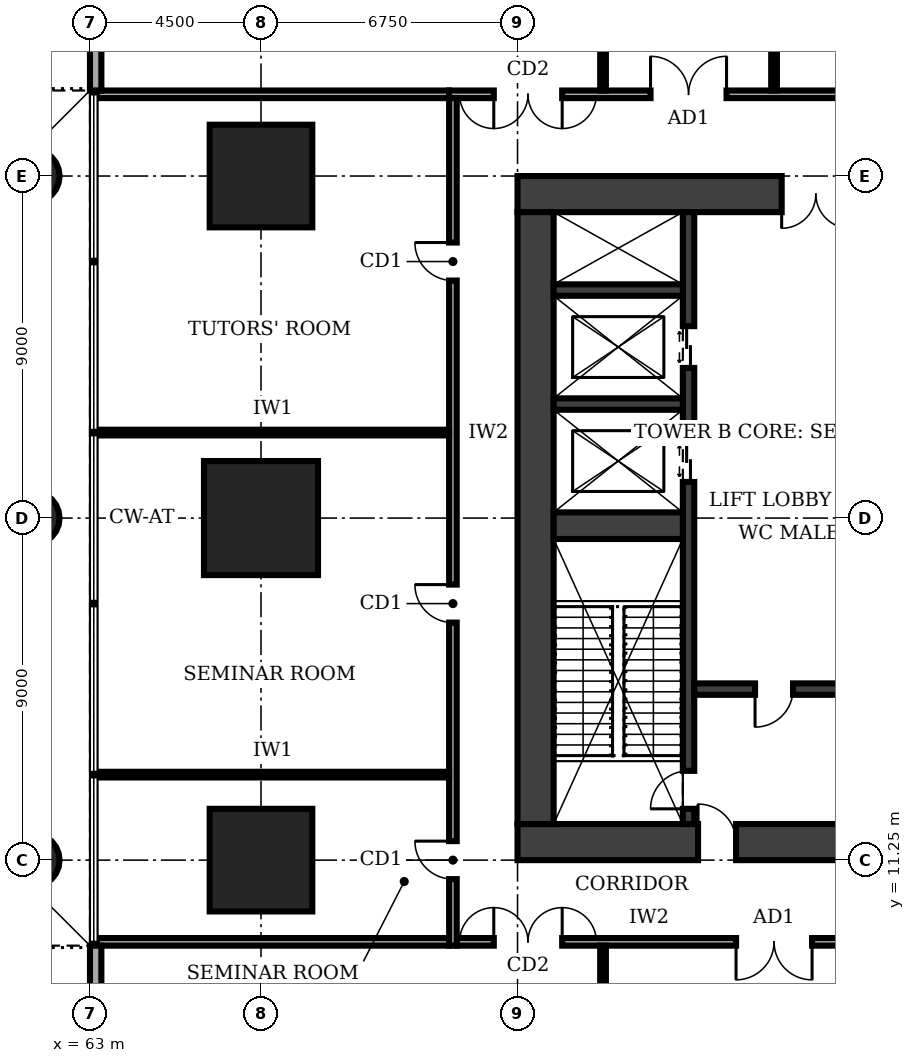
"""IFC4 building model, lengths in metres.
Left out: names, types, materials, properties, quantities, classifications, styles, units other than length and angle.
Written with IfcOpenShell. Run it as: python <this file> out.ifc"""

import sys

from ifc_helpers import new_model, si_unit, direction, frame, frame_2d, origin, origin_2d, place, context, subcontext, project, spatial, rectangle, circle, extrude, element, fill, save


model = new_model("IFC4")
c1 = context("Model", 3, precision=1e-05, world=origin(), true_north=direction((0.0, 1.0)))
c2 = subcontext(c1, "Body", "Model", "MODEL_VIEW")
j1 = project(units=[si_unit("LENGTHUNIT", "METRE"), si_unit("PLANEANGLEUNIT", "RADIAN")], contexts=[c1])
p1 = place(None, origin())
s1 = spatial("IfcSite", under=j1, at=p1, CompositionType="ELEMENT")
p2 = place(p1, origin())
s2 = spatial("IfcBuilding", under=s1, at=p2, CompositionType="ELEMENT")
p3 = place(p2, frame((0.0, 0.0, 6.0)))
s3 = spatial("IfcBuildingStorey", under=s2, at=p3, CompositionType="ELEMENT", Elevation=6.0)
p4 = place(p3, frame((74.25, 11.725, 0.0), z_axis=(0.0, 0.0, 1.0), x_axis=(1.0, 0.0, 0.0)))
e1 = element("IfcWall", 1, at=p4, inside=s3, PredefinedType="SHEAR", context=c2, shape_type="SweptSolid", body=[
    extrude(rectangle(XDim=13.5, YDim=0.95, at=frame_2d((6.75, 0.0))), origin(), (0.0, 0.0, 1.0), 5.0),
])
p5 = place(p4, frame((4.75, 0.0, 0.0)))
e2 = element("IfcOpeningElement", 2, at=p5, cuts=e1, PredefinedType="OPENING", context=c2, shape_type="SweptSolid", body=[
    extrude(rectangle(XDim=1.0, YDim=2.1, at=frame_2d((0.5, 1.05))), frame((0.0, 0.485, 0.0), z_axis=(0.0, -1.0, 0.0), x_axis=(1.0, 0.0, 0.0)), (0.0, 0.0, 1.0), 0.97),
])
p6 = place(p3, frame((87.75, 28.775, 0.0), z_axis=(0.0, 0.0, 1.0), x_axis=(-1.0, 0.0, 0.0)))
e3 = element("IfcWall", 3, at=p6, inside=s3, PredefinedType="SHEAR", context=c2, shape_type="SweptSolid", body=[
    extrude(rectangle(XDim=13.5, YDim=0.95, at=frame_2d((6.75, 0.0))), origin(), (0.0, 0.0, 1.0), 5.0),
])
p7 = place(p6, frame((4.75, 0.0, 0.0)))
e4 = element("IfcOpeningElement", 4, at=p7, cuts=e3, PredefinedType="OPENING", context=c2, shape_type="SweptSolid", body=[
    extrude(rectangle(XDim=1.8, YDim=2.1, at=frame_2d((0.9, 1.05))), frame((0.0, 0.485, 0.0), z_axis=(0.0, -1.0, 0.0), x_axis=(1.0, 0.0, 0.0)), (0.0, 0.0, 1.0), 0.97),
])
p8 = place(p3, frame((74.725, 28.3, 0.0), z_axis=(0.0, 0.0, 1.0), x_axis=(0.0, -1.0, 0.0)))
e5 = element("IfcWall", 5, at=p8, inside=s3, PredefinedType="SHEAR", context=c2, shape_type="SweptSolid", body=[
    extrude(rectangle(XDim=16.1, YDim=0.95, at=frame_2d((8.05, 0.0))), origin(), (0.0, 0.0, 1.0), 5.0),
])
p9 = place(p3, frame((78.75, 12.2, 0.0), z_axis=(0.0, 0.0, 1.0), x_axis=(0.0, 1.0, 0.0)))
e6 = element("IfcWall", 6, at=p9, inside=s3, PredefinedType="SHEAR", context=c2, shape_type="SweptSolid", body=[
    extrude(rectangle(XDim=16.1, YDim=0.3, at=frame_2d((8.05, 0.0))), origin(), (0.0, 0.0, 1.0), 5.0),
])
p10 = place(p9, frame((0.4, 0.0, 0.0)))
e7 = element("IfcOpeningElement", 7, at=p10, cuts=e6, PredefinedType="OPENING", context=c2, shape_type="SweptSolid", body=[
    extrude(rectangle(XDim=1.0, YDim=2.1, at=frame_2d((0.5, 1.05))), frame((0.0, 0.16, 0.0), z_axis=(0.0, -1.0, 0.0), x_axis=(1.0, 0.0, 0.0)), (0.0, 0.0, 1.0), 0.32),
])
p11 = place(p9, frame((9.0, 0.0, 0.0)))
e8 = element("IfcOpeningElement", 8, at=p11, cuts=e6, PredefinedType="OPENING", context=c2, shape_type="SweptSolid", body=[
    extrude(rectangle(XDim=1.1, YDim=2.1, at=frame_2d((0.55, 1.05))), frame((0.0, 0.16, 0.0), z_axis=(0.0, -1.0, 0.0), x_axis=(1.0, 0.0, 0.0)), (0.0, 0.0, 1.0), 0.32),
])
p12 = place(p9, frame((12.0, 0.0, 0.0)))
e9 = element("IfcOpeningElement", 9, at=p12, cuts=e6, PredefinedType="OPENING", context=c2, shape_type="SweptSolid", body=[
    extrude(rectangle(XDim=1.1, YDim=2.1, at=frame_2d((0.55, 1.05))), frame((0.0, 0.16, 0.0), z_axis=(0.0, -1.0, 0.0), x_axis=(1.0, 0.0, 0.0)), (0.0, 0.0, 1.0), 0.32),
])
p13 = place(p3, frame((75.2, 20.05, 0.0), z_axis=(0.0, 0.0, 1.0), x_axis=(1.0, 0.0, 0.0)))
e10 = element("IfcWall", 10, at=p13, inside=s3, PredefinedType="SHEAR", context=c2, shape_type="SweptSolid", body=[
    extrude(rectangle(XDim=3.4, YDim=0.7, at=frame_2d((1.7, 0.0))), origin(), (0.0, 0.0, 1.0), 5.0),
])
p14 = place(p3, frame((78.9, 15.75, 0.0), z_axis=(0.0, 0.0, 1.0), x_axis=(1.0, 0.0, 0.0)))
e11 = element("IfcWall", 11, at=p14, inside=s3, PredefinedType="SHEAR", context=c2, shape_type="SweptSolid", body=[
    extrude(rectangle(XDim=4.2, YDim=0.3, at=frame_2d((2.1, 0.0))), origin(), (0.0, 0.0, 1.0), 5.0),
])
p15 = place(p14, frame((1.6, 0.0, 0.0)))
e12 = element("IfcOpeningElement", 12, at=p15, cuts=e11, PredefinedType="OPENING", context=c2, shape_type="SweptSolid", body=[
    extrude(rectangle(XDim=1.0, YDim=2.1, at=frame_2d((0.5, 1.05))), frame((0.0, 0.16, 0.0), z_axis=(0.0, -1.0, 0.0), x_axis=(1.0, 0.0, 0.0)), (0.0, 0.0, 1.0), 0.32),
])
for number, where, z_axis, x_axis in (
    (13, (75.2, 23.25, 0.0), (0.0, 0.0, 1.0), (1.0, 0.0, 0.0)),
    (14, (75.2, 26.25, 0.0), (0.0, 0.0, 1.0), (1.0, 0.0, 0.0)),
):
    element("IfcWall", number, at=place(p3, frame(where, z_axis=z_axis, x_axis=x_axis)), inside=s3, PredefinedType="SHEAR", context=c2, shape_type="SweptSolid", body=[
        extrude(rectangle(XDim=3.4, YDim=0.3, at=frame_2d((1.7, 0.0))), origin(), (0.0, 0.0, 1.0), 5.0),
    ])
p16 = place(p3, frame((67.5, 11.25, 0.0), z_axis=(0.0, 0.0, 1.0), x_axis=(1.0, 0.0, 0.0)))
e15 = element("IfcColumn", 15, at=p16, inside=s3, PredefinedType="COLUMN", context=c2, shape_type="SweptSolid", body=[
    extrude(rectangle(XDim=2.7, YDim=2.7, at=origin_2d()), origin(), (0.0, 0.0, 1.0), 5.0),
])
p17 = place(p3, frame((67.5, 20.25, 0.0), z_axis=(0.0, 0.0, 1.0), x_axis=(1.0, 0.0, 0.0)))
e16 = element("IfcColumn", 16, at=p17, inside=s3, PredefinedType="COLUMN", context=c2, shape_type="SweptSolid", body=[
    extrude(rectangle(XDim=3.0, YDim=3.0, at=origin_2d()), origin(), (0.0, 0.0, 1.0), 5.0),
])
p18 = place(p3, frame((67.5, 29.25, 0.0), z_axis=(0.0, 0.0, 1.0), x_axis=(1.0, 0.0, 0.0)))
e17 = element("IfcColumn", 17, at=p18, inside=s3, PredefinedType="COLUMN", context=c2, shape_type="SweptSolid", body=[
    extrude(rectangle(XDim=2.7, YDim=2.7, at=origin_2d()), origin(), (0.0, 0.0, 1.0), 5.0),
])
for number, where, z_axis, x_axis in (
    (18, (61.5, 11.25, 0.0), (0.0, 0.0, 1.0), (1.0, 0.0, 0.0)),
    (19, (61.5, 20.25, 0.0), (0.0, 0.0, 1.0), (1.0, 0.0, 0.0)),
    (20, (61.5, 29.25, 0.0), (0.0, 0.0, 1.0), (1.0, 0.0, 0.0)),
):
    element("IfcColumn", number, at=place(p3, frame(where, z_axis=z_axis, x_axis=x_axis)), inside=s3, PredefinedType="COLUMN", context=c2, shape_type="SweptSolid", body=[
        extrude(circle(Radius=0.7, at=origin_2d()), origin(), (0.0, 0.0, 1.0), 5.0),
    ])
p19 = place(p3, frame((72.65, 9.1, 0.0), z_axis=(0.0, 0.0, 1.0), x_axis=(1.0, 0.0, 0.0)))
e21 = element("IfcWall", 21, at=p19, inside=s3, PredefinedType="SOLIDWALL", context=c2, shape_type="SweptSolid", body=[
    extrude(rectangle(XDim=16.9, YDim=0.2, at=frame_2d((8.45, 0.0))), origin(), (0.0, 0.0, 1.0), 4.7),
])
p20 = place(p19, frame((0.975, 0.0, 0.0)))
e22 = element("IfcOpeningElement", 22, at=p20, cuts=e21, PredefinedType="OPENING", context=c2, shape_type="SweptSolid", body=[
    extrude(rectangle(XDim=1.8, YDim=2.1, at=frame_2d((0.9, 1.05))), frame((0.0, 0.11, 0.0), z_axis=(0.0, -1.0, 0.0), x_axis=(1.0, 0.0, 0.0)), (0.0, 0.0, 1.0), 0.22),
])
p21 = place(p19, frame((7.35, 0.0, 0.0)))
e23 = element("IfcOpeningElement", 23, at=p21, cuts=e21, PredefinedType="OPENING", context=c2, shape_type="SweptSolid", body=[
    extrude(rectangle(XDim=2.0, YDim=2.4, at=frame_2d((1.0, 1.2))), frame((0.0, 0.11, 0.0), z_axis=(0.0, -1.0, 0.0), x_axis=(1.0, 0.0, 0.0)), (0.0, 0.0, 1.0), 0.22),
])
p22 = place(p19, frame((13.625, 0.0, 0.0)))
e24 = element("IfcOpeningElement", 24, at=p22, cuts=e21, PredefinedType="OPENING", context=c2, shape_type="SweptSolid", body=[
    extrude(rectangle(XDim=2.0, YDim=2.4, at=frame_2d((1.0, 1.2))), frame((0.0, 0.11, 0.0), z_axis=(0.0, -1.0, 0.0), x_axis=(1.0, 0.0, 0.0)), (0.0, 0.0, 1.0), 0.22),
])
p23 = place(p3, frame((89.35, 31.4, 0.0), z_axis=(0.0, 0.0, 1.0), x_axis=(-1.0, 0.0, 0.0)))
e25 = element("IfcWall", 25, at=p23, inside=s3, PredefinedType="SOLIDWALL", context=c2, shape_type="SweptSolid", body=[
    extrude(rectangle(XDim=16.9, YDim=0.2, at=frame_2d((8.45, 0.0))), origin(), (0.0, 0.0, 1.0), 4.7),
])
p24 = place(p23, frame((13.925, 0.0, 0.0)))
e26 = element("IfcOpeningElement", 26, at=p24, cuts=e25, PredefinedType="OPENING", context=c2, shape_type="SweptSolid", body=[
    extrude(rectangle(XDim=1.8, YDim=2.1, at=frame_2d((0.9, 1.05))), frame((0.0, 0.11, 0.0), z_axis=(0.0, -1.0, 0.0), x_axis=(1.0, 0.0, 0.0)), (0.0, 0.0, 1.0), 0.22),
])
p25 = place(p23, frame((9.6, 0.0, 0.0)))
e27 = element("IfcOpeningElement", 27, at=p25, cuts=e25, PredefinedType="OPENING", context=c2, shape_type="SweptSolid", body=[
    extrude(rectangle(XDim=2.0, YDim=2.4, at=frame_2d((1.0, 1.2))), frame((0.0, 0.11, 0.0), z_axis=(0.0, -1.0, 0.0), x_axis=(1.0, 0.0, 0.0)), (0.0, 0.0, 1.0), 0.22),
])
p26 = place(p23, frame((5.6, 0.0, 0.0)))
e28 = element("IfcOpeningElement", 28, at=p26, cuts=e25, PredefinedType="OPENING", context=c2, shape_type="SweptSolid", body=[
    extrude(rectangle(XDim=1.0, YDim=2.1, at=frame_2d((0.5, 1.05))), frame((0.0, 0.11, 0.0), z_axis=(0.0, -1.0, 0.0), x_axis=(1.0, 0.0, 0.0)), (0.0, 0.0, 1.0), 0.22),
])
p27 = place(p23, frame((0.925, 0.0, 0.0)))
e29 = element("IfcOpeningElement", 29, at=p27, cuts=e25, PredefinedType="OPENING", context=c2, shape_type="SweptSolid", body=[
    extrude(rectangle(XDim=1.8, YDim=2.1, at=frame_2d((0.9, 1.05))), frame((0.0, 0.11, 0.0), z_axis=(0.0, -1.0, 0.0), x_axis=(1.0, 0.0, 0.0)), (0.0, 0.0, 1.0), 0.22),
])
p28 = place(p3, frame((72.55, 31.3, 0.0), z_axis=(0.0, 0.0, 1.0), x_axis=(0.0, -1.0, 0.0)))
e30 = element("IfcWall", 30, at=p28, inside=s3, PredefinedType="SOLIDWALL", context=c2, shape_type="SweptSolid", body=[
    extrude(rectangle(XDim=22.3, YDim=0.2, at=frame_2d((11.15, 0.0))), origin(), (0.0, 0.0, 1.0), 4.7),
])
p29 = place(p28, frame((19.55, 0.0, 0.0)))
e31 = element("IfcOpeningElement", 31, at=p29, cuts=e30, PredefinedType="OPENING", context=c2, shape_type="SweptSolid", body=[
    extrude(rectangle(XDim=1.0, YDim=2.1, at=frame_2d((0.5, 1.05))), frame((0.0, 0.11, 0.0), z_axis=(0.0, -1.0, 0.0), x_axis=(1.0, 0.0, 0.0)), (0.0, 0.0, 1.0), 0.22),
])
p30 = place(p28, frame((12.8, 0.0, 0.0)))
e32 = element("IfcOpeningElement", 32, at=p30, cuts=e30, PredefinedType="OPENING", context=c2, shape_type="SweptSolid", body=[
    extrude(rectangle(XDim=1.0, YDim=2.1, at=frame_2d((0.5, 1.05))), frame((0.0, 0.11, 0.0), z_axis=(0.0, -1.0, 0.0), x_axis=(1.0, 0.0, 0.0)), (0.0, 0.0, 1.0), 0.22),
])
p31 = place(p28, frame((3.8, 0.0, 0.0)))
e33 = element("IfcOpeningElement", 33, at=p31, cuts=e30, PredefinedType="OPENING", context=c2, shape_type="SweptSolid", body=[
    extrude(rectangle(XDim=1.0, YDim=2.1, at=frame_2d((0.5, 1.05))), frame((0.0, 0.11, 0.0), z_axis=(0.0, -1.0, 0.0), x_axis=(1.0, 0.0, 0.0)), (0.0, 0.0, 1.0), 0.22),
])
for number, where, z_axis, x_axis in (
    (34, (63.18, 9.1, 0.0), (0.0, 0.0, 1.0), (1.0, 0.0, 0.0)),
    (35, (63.18, 31.4, 0.0), (0.0, 0.0, 1.0), (1.0, 0.0, 0.0)),
):
    element("IfcWall", number, at=place(p3, frame(where, z_axis=z_axis, x_axis=x_axis)), inside=s3, PredefinedType="SOLIDWALL", context=c2, shape_type="SweptSolid", body=[
        extrude(rectangle(XDim=9.27, YDim=0.2, at=frame_2d((4.635, 0.0))), origin(), (0.0, 0.0, 1.0), 4.7),
    ])
p32 = place(p3, frame((76.5, -4.2, 0.0), z_axis=(0.0, 0.0, 1.0), x_axis=(0.0, 1.0, 0.0)))
e36 = element("IfcWall", 36, at=p32, inside=s3, PredefinedType="PARTITIONING", context=c2, shape_type="SweptSolid", body=[
    extrude(rectangle(XDim=13.2, YDim=0.15, at=frame_2d((6.6, 0.0))), origin(), (0.0, 0.0, 1.0), 4.7),
])
p33 = place(p3, frame((76.5, 31.5, 0.0), z_axis=(0.0, 0.0, 1.0), x_axis=(0.0, 1.0, 0.0)))
e37 = element("IfcWall", 37, at=p33, inside=s3, PredefinedType="PARTITIONING", context=c2, shape_type="SweptSolid", body=[
    extrude(rectangle(XDim=17.7, YDim=0.15, at=frame_2d((8.85, 0.0))), origin(), (0.0, 0.0, 1.0), 4.7),
])
p34 = place(p33, frame((12.85, 0.0, 0.0)))
e38 = element("IfcOpeningElement", 38, at=p34, cuts=e37, PredefinedType="OPENING", context=c2, shape_type="SweptSolid", body=[
    extrude(rectangle(XDim=1.0, YDim=2.1, at=frame_2d((0.5, 1.05))), frame((0.0, 0.085, 0.0), z_axis=(0.0, -1.0, 0.0), x_axis=(1.0, 0.0, 0.0)), (0.0, 0.0, 1.0), 0.17),
])
p35 = place(p3, frame((81.0, 31.5, 0.0), z_axis=(0.0, 0.0, 1.0), x_axis=(0.0, 1.0, 0.0)))
e39 = element("IfcWall", 39, at=p35, inside=s3, PredefinedType="PARTITIONING", context=c2, shape_type="SweptSolid", body=[
    extrude(rectangle(XDim=4.9, YDim=0.15, at=frame_2d((2.45, 0.0))), origin(), (0.0, 0.0, 1.0), 4.7),
])
for number, where, z_axis, x_axis in (
    (40, (63.18, 13.5, 0.0), (0.0, 0.0, 1.0), (1.0, 0.0, 0.0)),
    (41, (63.18, 22.5, 0.0), (0.0, 0.0, 1.0), (1.0, 0.0, 0.0)),
):
    element("IfcWall", number, at=place(p3, frame(where, z_axis=z_axis, x_axis=x_axis)), inside=s3, PredefinedType="PARTITIONING", context=c2, shape_type="SweptSolid", body=[
        extrude(rectangle(XDim=9.27, YDim=0.15, at=frame_2d((4.635, 0.0))), origin(), (0.0, 0.0, 1.0), 4.7),
    ])
p36 = place(p3, frame((63.15, 4.97, 0.0), z_axis=(0.0, 0.0, 1.0), x_axis=(0.0, 1.0, 0.0)))
e42 = element("IfcWall", 42, at=p36, inside=s3, PredefinedType="SOLIDWALL", context=c2, shape_type="SweptSolid", body=[
    extrude(rectangle(XDim=4.03, YDim=0.3, at=frame_2d((2.015, 0.0))), origin(), (0.0, 0.0, 1.0), 4.7),
])
p37 = place(p3, frame((63.15, 31.5, 0.0), z_axis=(0.0, 0.0, 1.0), x_axis=(0.0, 1.0, 0.0)))
e43 = element("IfcWall", 43, at=p37, inside=s3, PredefinedType="SOLIDWALL", context=c2, shape_type="SweptSolid", body=[
    extrude(rectangle(XDim=16.63, YDim=0.3, at=frame_2d((8.315, 0.0))), origin(), (0.0, 0.0, 1.0), 4.7),
])
p38 = place(p37, frame((12.1, 0.0, 0.0)))
e44 = element("IfcOpeningElement", 44, at=p38, cuts=e43, PredefinedType="OPENING", context=c2, shape_type="SweptSolid", body=[
    extrude(rectangle(XDim=1.8, YDim=2.1, at=frame_2d((0.9, 1.05))), frame((0.0, 0.16, 0.0), z_axis=(0.0, -1.0, 0.0), x_axis=(1.0, 0.0, 0.0)), (0.0, 0.0, 1.0), 0.32),
])
p39 = place(p5, origin())
e45 = element("IfcDoor", 45, at=p39, inside=s3, OperationType="SINGLE_SWING_LEFT", PredefinedType="DOOR", context=c2, shape_type="SweptSolid", body=[
    extrude(rectangle(XDim=1.0, YDim=2.1, at=frame_2d((0.5, 1.05))), frame((0.0, 0.025, 0.0), z_axis=(0.0, -1.0, 0.0), x_axis=(1.0, 0.0, 0.0)), (0.0, 0.0, 1.0), 0.05),
])
fill(e2, e45)
p40 = place(p7, origin())
e46 = element("IfcDoor", 46, at=p40, inside=s3, OperationType="DOUBLE_DOOR_SINGLE_SWING", PredefinedType="DOOR", context=c2, shape_type="SweptSolid", body=[
    extrude(rectangle(XDim=1.8, YDim=2.1, at=frame_2d((0.9, 1.05))), frame((0.0, 0.025, 0.0), z_axis=(0.0, -1.0, 0.0), x_axis=(1.0, 0.0, 0.0)), (0.0, 0.0, 1.0), 0.05),
])
fill(e4, e46)
p41 = place(p15, frame((1.0, 0.0, 0.0), z_axis=(0.0, 0.0, 1.0), x_axis=(-1.0, 0.0, 0.0)))
e47 = element("IfcDoor", 47, at=p41, inside=s3, OperationType="SINGLE_SWING_RIGHT", PredefinedType="DOOR", context=c2, shape_type="SweptSolid", body=[
    extrude(rectangle(XDim=1.0, YDim=2.1, at=frame_2d((0.5, 1.05))), frame((0.0, 0.025, 0.0), z_axis=(0.0, -1.0, 0.0), x_axis=(1.0, 0.0, 0.0)), (0.0, 0.0, 1.0), 0.05),
])
fill(e12, e47)
p42 = place(p10, origin())
e48 = element("IfcDoor", 48, at=p42, inside=s3, OperationType="SINGLE_SWING_LEFT", PredefinedType="DOOR", context=c2, shape_type="SweptSolid", body=[
    extrude(rectangle(XDim=1.0, YDim=2.1, at=frame_2d((0.5, 1.05))), frame((0.0, 0.025, 0.0), z_axis=(0.0, -1.0, 0.0), x_axis=(1.0, 0.0, 0.0)), (0.0, 0.0, 1.0), 0.05),
])
fill(e7, e48)
p43 = place(p11, origin())
e49 = element("IfcDoor", 49, at=p43, inside=s3, OperationType="DOUBLE_DOOR_SLIDING", PredefinedType="DOOR", context=c2, shape_type="SweptSolid", body=[
    extrude(rectangle(XDim=1.1, YDim=2.1, at=frame_2d((0.55, 1.05))), frame((0.0, 0.025, 0.0), z_axis=(0.0, -1.0, 0.0), x_axis=(1.0, 0.0, 0.0)), (0.0, 0.0, 1.0), 0.05),
])
fill(e8, e49)
p44 = place(p12, origin())
e50 = element("IfcDoor", 50, at=p44, inside=s3, OperationType="DOUBLE_DOOR_SLIDING", PredefinedType="DOOR", context=c2, shape_type="SweptSolid", body=[
    extrude(rectangle(XDim=1.1, YDim=2.1, at=frame_2d((0.55, 1.05))), frame((0.0, 0.025, 0.0), z_axis=(0.0, -1.0, 0.0), x_axis=(1.0, 0.0, 0.0)), (0.0, 0.0, 1.0), 0.05),
])
fill(e9, e50)
p45 = place(p20, origin())
e51 = element("IfcDoor", 51, at=p45, inside=s3, OperationType="DOUBLE_DOOR_SINGLE_SWING", PredefinedType="DOOR", context=c2, shape_type="SweptSolid", body=[
    extrude(rectangle(XDim=1.8, YDim=2.1, at=frame_2d((0.9, 1.05))), frame((0.0, 0.025, 0.0), z_axis=(0.0, -1.0, 0.0), x_axis=(1.0, 0.0, 0.0)), (0.0, 0.0, 1.0), 0.05),
])
fill(e22, e51)
p46 = place(p21, frame((2.0, 0.0, 0.0), z_axis=(0.0, 0.0, 1.0), x_axis=(-1.0, 0.0, 0.0)))
e52 = element("IfcDoor", 52, at=p46, inside=s3, OperationType="DOUBLE_DOOR_SINGLE_SWING", PredefinedType="DOOR", context=c2, shape_type="SweptSolid", body=[
    extrude(rectangle(XDim=2.0, YDim=2.4, at=frame_2d((1.0, 1.2))), frame((0.0, 0.025, 0.0), z_axis=(0.0, -1.0, 0.0), x_axis=(1.0, 0.0, 0.0)), (0.0, 0.0, 1.0), 0.05),
])
fill(e23, e52)
p47 = place(p24, origin())
e53 = element("IfcDoor", 53, at=p47, inside=s3, OperationType="DOUBLE_DOOR_SINGLE_SWING", PredefinedType="DOOR", context=c2, shape_type="SweptSolid", body=[
    extrude(rectangle(XDim=1.8, YDim=2.1, at=frame_2d((0.9, 1.05))), frame((0.0, 0.025, 0.0), z_axis=(0.0, -1.0, 0.0), x_axis=(1.0, 0.0, 0.0)), (0.0, 0.0, 1.0), 0.05),
])
fill(e26, e53)
p48 = place(p25, frame((2.0, 0.0, 0.0), z_axis=(0.0, 0.0, 1.0), x_axis=(-1.0, 0.0, 0.0)))
e54 = element("IfcDoor", 54, at=p48, inside=s3, OperationType="DOUBLE_DOOR_SINGLE_SWING", PredefinedType="DOOR", context=c2, shape_type="SweptSolid", body=[
    extrude(rectangle(XDim=2.0, YDim=2.4, at=frame_2d((1.0, 1.2))), frame((0.0, 0.025, 0.0), z_axis=(0.0, -1.0, 0.0), x_axis=(1.0, 0.0, 0.0)), (0.0, 0.0, 1.0), 0.05),
])
fill(e27, e54)
p49 = place(p29, frame((1.0, 0.0, 0.0), z_axis=(0.0, 0.0, 1.0), x_axis=(-1.0, 0.0, 0.0)))
e55 = element("IfcDoor", 55, at=p49, inside=s3, OperationType="SINGLE_SWING_RIGHT", PredefinedType="DOOR", context=c2, shape_type="SweptSolid", body=[
    extrude(rectangle(XDim=1.0, YDim=2.1, at=frame_2d((0.5, 1.05))), frame((0.0, 0.025, 0.0), z_axis=(0.0, -1.0, 0.0), x_axis=(1.0, 0.0, 0.0)), (0.0, 0.0, 1.0), 0.05),
])
fill(e31, e55)
p50 = place(p30, frame((1.0, 0.0, 0.0), z_axis=(0.0, 0.0, 1.0), x_axis=(-1.0, 0.0, 0.0)))
e56 = element("IfcDoor", 56, at=p50, inside=s3, OperationType="SINGLE_SWING_RIGHT", PredefinedType="DOOR", context=c2, shape_type="SweptSolid", body=[
    extrude(rectangle(XDim=1.0, YDim=2.1, at=frame_2d((0.5, 1.05))), frame((0.0, 0.025, 0.0), z_axis=(0.0, -1.0, 0.0), x_axis=(1.0, 0.0, 0.0)), (0.0, 0.0, 1.0), 0.05),
])
fill(e32, e56)
p51 = place(p31, frame((1.0, 0.0, 0.0), z_axis=(0.0, 0.0, 1.0), x_axis=(-1.0, 0.0, 0.0)))
e57 = element("IfcDoor", 57, at=p51, inside=s3, OperationType="SINGLE_SWING_RIGHT", PredefinedType="DOOR", context=c2, shape_type="SweptSolid", body=[
    extrude(rectangle(XDim=1.0, YDim=2.1, at=frame_2d((0.5, 1.05))), frame((0.0, 0.025, 0.0), z_axis=(0.0, -1.0, 0.0), x_axis=(1.0, 0.0, 0.0)), (0.0, 0.0, 1.0), 0.05),
])
fill(e33, e57)
save(model, sys.argv[1])
